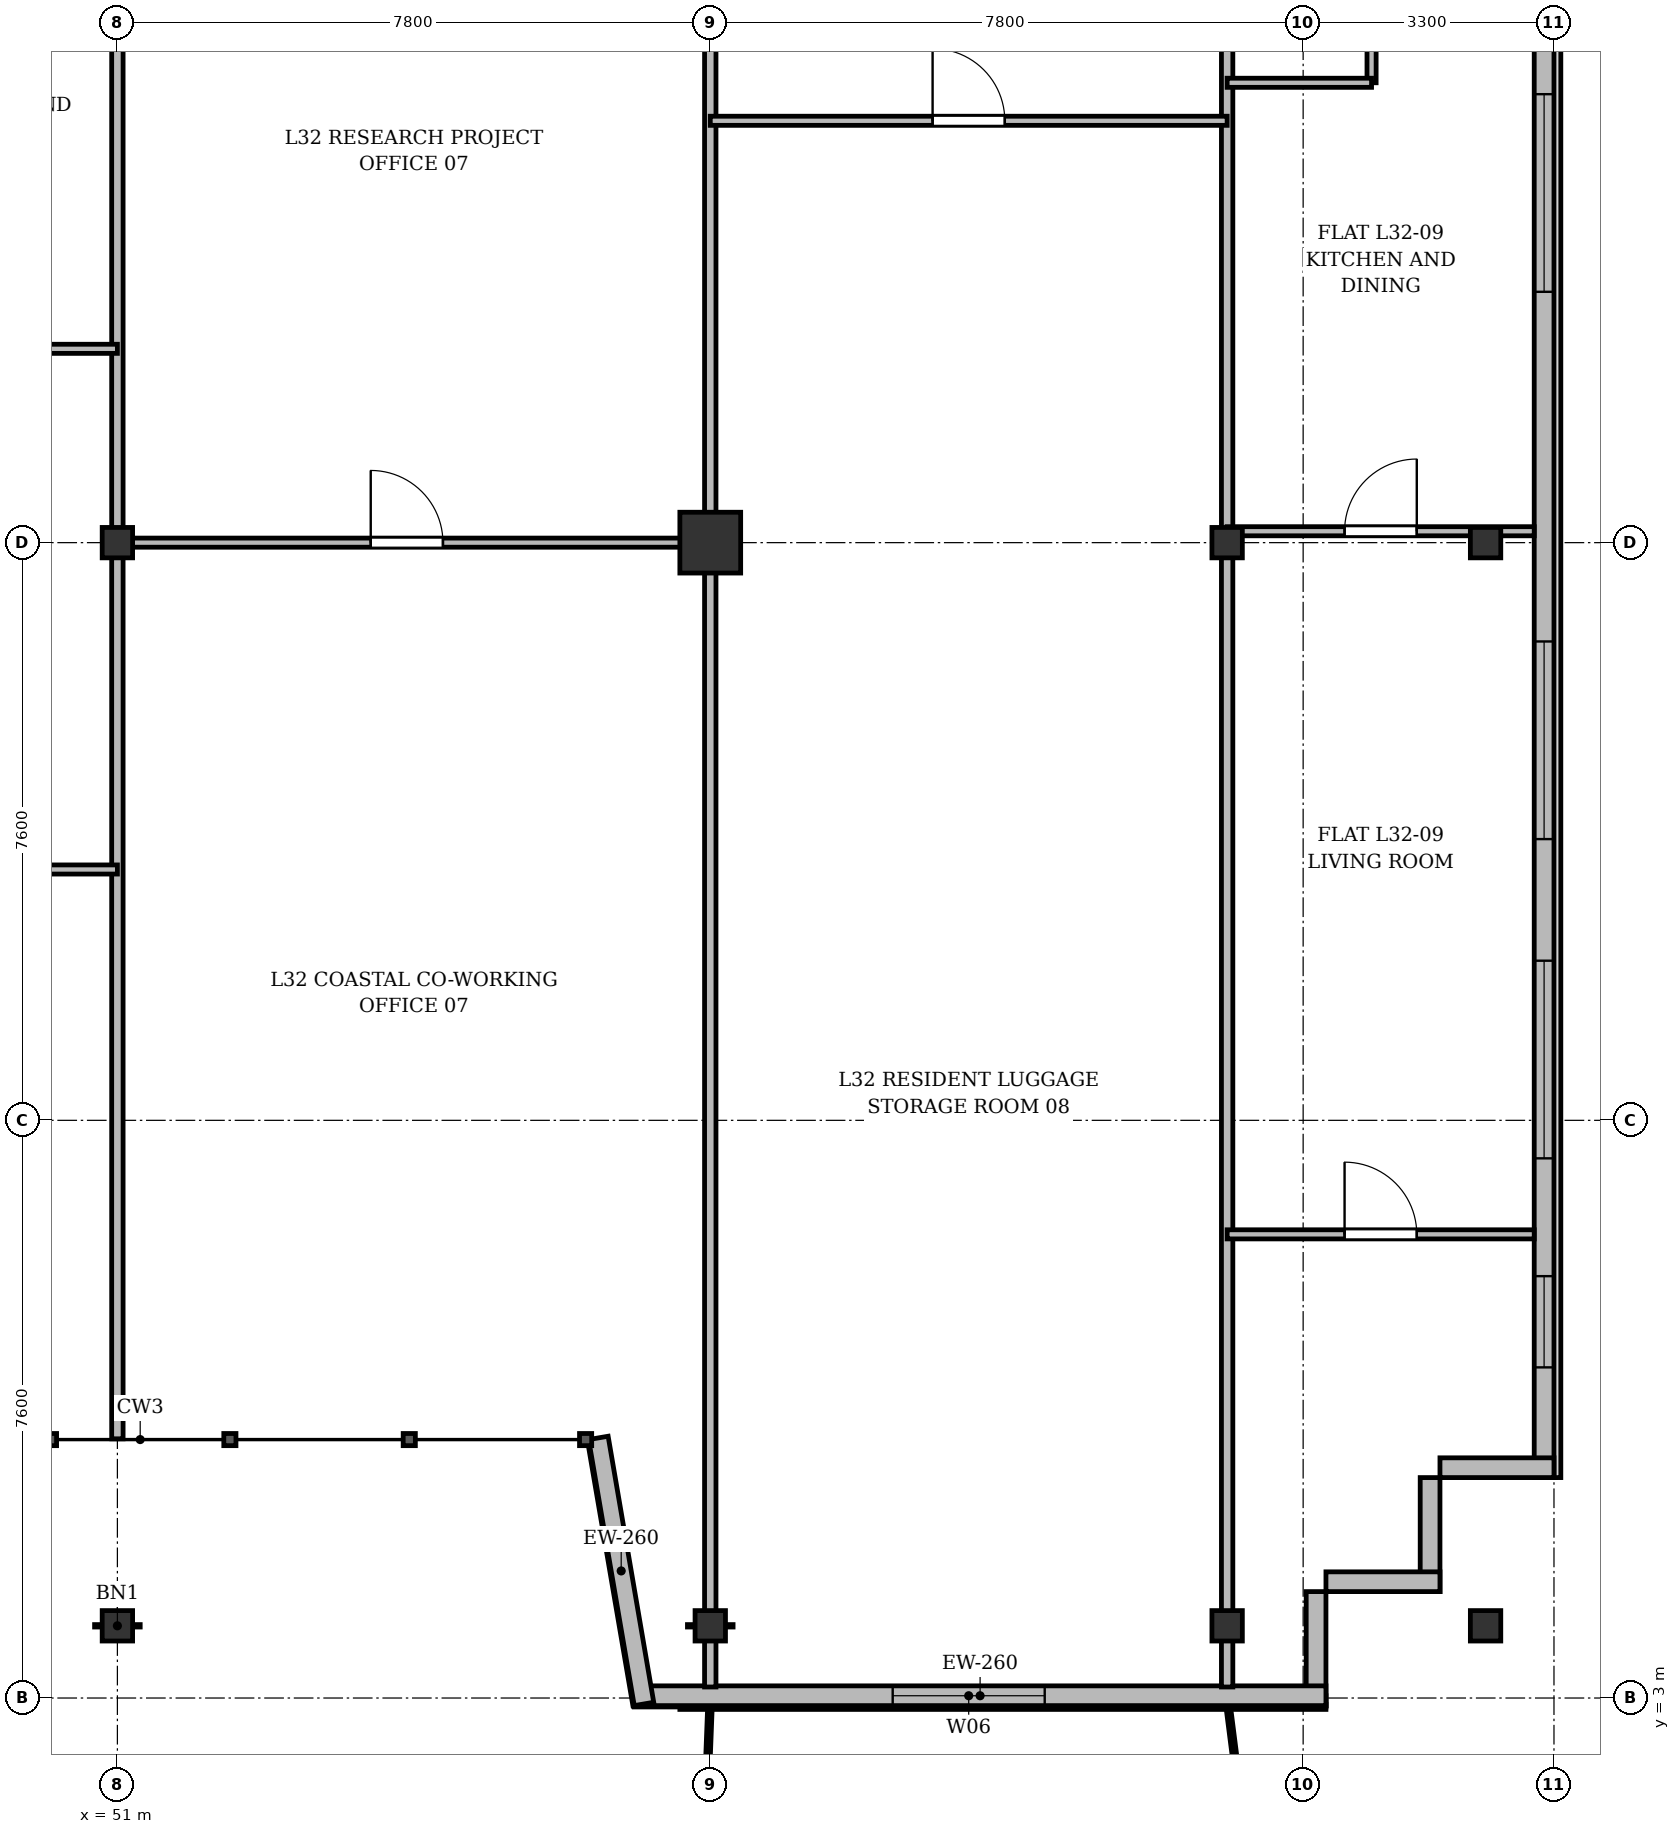
"""IFC4 building model, lengths in metres.
Left out: names, types, materials, properties, quantities, classifications, styles, units other than length and angle.
Written with IfcOpenShell. Run it as: python <this file> out.ifc"""

import sys

from ifc_helpers import new_model, si_unit, direction, frame, frame_2d, origin, origin_2d, place, context, subcontext, project, spatial, rectangle, i_section, extrude, source, transform, mapped, element, fill, save


model = new_model("IFC4")
c1 = context("Model", 3, precision=1e-05, world=origin(), true_north=direction((0.0, 1.0)))
c2 = subcontext(c1, "Body", "Model", "MODEL_VIEW")
j1 = project(units=[si_unit("LENGTHUNIT", "METRE"), si_unit("PLANEANGLEUNIT", "RADIAN")], contexts=[c1])
p1 = place(None, origin())
s1 = spatial("IfcSite", under=j1, at=p1, CompositionType="ELEMENT")
p2 = place(p1, origin())
s2 = spatial("IfcBuilding", under=s1, at=p2, CompositionType="ELEMENT")
p3 = place(p2, frame((0.0, 0.0, 124.9)))
s3 = spatial("IfcBuildingStorey", under=s2, at=p3, CompositionType="ELEMENT", Elevation=124.9)
m1 = source(origin(), c2, "Body", "SweptSolid", [
    extrude(i_section(OverallWidth=0.4, OverallDepth=0.4, WebThickness=0.022, FlangeThickness=0.035, at=origin_2d()), origin(), (0.0, 0.0, 1.0), 3.6),
])
for number, where, z_axis, x_axis in (
    (1, (51.0, 3.95, 0.0), (0.0, 0.0, 1.0), (1.0, 0.0, 0.0)),
    (2, (51.0, 18.2, 0.0), (0.0, 0.0, 1.0), (1.0, 0.0, 0.0)),
    (3, (58.8, 3.95, 0.0), (0.0, 0.0, 1.0), (1.0, 0.0, 0.0)),
):
    element("IfcColumn", number, at=place(p3, frame(where, z_axis=z_axis, x_axis=x_axis)), inside=s3, PredefinedType="COLUMN", context=c2, shape_type="MappedRepresentation", body=[
        mapped(m1, transform((0.0, 0.0, 0.0), x_axis=(1.0, 0.0, 0.0), y_axis=(0.0, 1.0, 0.0), z_axis=(0.0, 0.0, 1.0), scale=1.0)),
    ])
m2 = source(origin(), c2, "Body", "SweptSolid", [
    extrude(rectangle(XDim=0.8, YDim=0.8, at=origin_2d()), origin(), (0.0, 0.0, 1.0), 3.6),
])
p4 = place(p3, frame((58.8, 18.2, 0.0), z_axis=(0.0, 0.0, 1.0), x_axis=(1.0, 0.0, 0.0)))
e4 = element("IfcColumn", 4, at=p4, inside=s3, PredefinedType="COLUMN", context=c2, shape_type="MappedRepresentation", body=[
    mapped(m2, transform((0.0, 0.0, 0.0), x_axis=(1.0, 0.0, 0.0), y_axis=(0.0, 1.0, 0.0), z_axis=(0.0, 0.0, 1.0), scale=1.0)),
])
for number, where, z_axis, x_axis in (
    (5, (65.6, 3.95, 0.0), (0.0, 0.0, 1.0), (1.0, 0.0, 0.0)),
    (6, (65.6, 18.2, 0.0), (0.0, 0.0, 1.0), (1.0, 0.0, 0.0)),
    (7, (69.0, 3.95, 0.0), (0.0, 0.0, 1.0), (1.0, 0.0, 0.0)),
    (8, (69.0, 18.2, 0.0), (0.0, 0.0, 1.0), (1.0, 0.0, 0.0)),
):
    element("IfcColumn", number, at=place(p3, frame(where, z_axis=z_axis, x_axis=x_axis)), inside=s3, PredefinedType="COLUMN", context=c2, shape_type="MappedRepresentation", body=[
        mapped(m1, transform((0.0, 0.0, 0.0), x_axis=(1.0, 0.0, 0.0), y_axis=(0.0, 1.0, 0.0), z_axis=(0.0, 0.0, 1.0), scale=1.0)),
    ])
p5 = place(p3, frame((69.77, 45.5, 0.0), z_axis=(0.0, 0.0, 1.0), x_axis=(0.0, -1.0, 0.0)))
e9 = element("IfcWall", 9, at=p5, inside=s3, PredefinedType="SOLIDWALL", context=c2, shape_type="SweptSolid", body=[
    extrude(rectangle(XDim=39.6, YDim=0.26, at=frame_2d((19.8, 0.0))), origin(), (0.0, 0.0, 1.0), 3.34),
])
p6 = place(p5, frame((36.95, 0.0, 0.92)))
e10 = element("IfcOpeningElement", 10, at=p6, cuts=e9, PredefinedType="OPENING", context=c2, shape_type="SweptSolid", body=[
    extrude(rectangle(XDim=1.2, YDim=1.65, at=frame_2d((0.6, 0.825))), frame((0.0, 0.14, 0.0), z_axis=(0.0, -1.0, 0.0), x_axis=(1.0, 0.0, 0.0)), (0.0, 0.0, 1.0), 0.28),
])
p7 = place(p5, frame((32.8, 0.0, 0.92)))
e11 = element("IfcOpeningElement", 11, at=p7, cuts=e9, PredefinedType="OPENING", context=c2, shape_type="SweptSolid", body=[
    extrude(rectangle(XDim=2.6, YDim=1.9, at=frame_2d((1.3, 0.95))), frame((0.0, 0.14, 0.0), z_axis=(0.0, -1.0, 0.0), x_axis=(1.0, 0.0, 0.0)), (0.0, 0.0, 1.0), 0.28),
])
p8 = place(p5, frame((28.6, 0.0, 0.92)))
e12 = element("IfcOpeningElement", 12, at=p8, cuts=e9, PredefinedType="OPENING", context=c2, shape_type="SweptSolid", body=[
    extrude(rectangle(XDim=2.6, YDim=1.9, at=frame_2d((1.3, 0.95))), frame((0.0, 0.14, 0.0), z_axis=(0.0, -1.0, 0.0), x_axis=(1.0, 0.0, 0.0)), (0.0, 0.0, 1.0), 0.28),
])
p9 = place(p5, frame((21.4, 0.0, 0.92)))
e13 = element("IfcOpeningElement", 13, at=p9, cuts=e9, PredefinedType="OPENING", context=c2, shape_type="SweptSolid", body=[
    extrude(rectangle(XDim=2.6, YDim=1.9, at=frame_2d((1.3, 0.95))), frame((0.0, 0.14, 0.0), z_axis=(0.0, -1.0, 0.0), x_axis=(1.0, 0.0, 0.0)), (0.0, 0.0, 1.0), 0.28),
])
p10 = place(p5, frame((7.4, 0.0, 0.92)))
e14 = element("IfcOpeningElement", 14, at=p10, cuts=e9, PredefinedType="OPENING", context=c2, shape_type="SweptSolid", body=[
    extrude(rectangle(XDim=2.6, YDim=1.9, at=frame_2d((1.3, 0.95))), frame((0.0, 0.14, 0.0), z_axis=(0.0, -1.0, 0.0), x_axis=(1.0, 0.0, 0.0)), (0.0, 0.0, 1.0), 0.28),
])
p11 = place(p5, frame((4.5, 0.0, 0.92)))
e15 = element("IfcOpeningElement", 15, at=p11, cuts=e9, PredefinedType="OPENING", context=c2, shape_type="SweptSolid", body=[
    extrude(rectangle(XDim=1.2, YDim=1.65, at=frame_2d((0.6, 0.825))), frame((0.0, 0.14, 0.0), z_axis=(0.0, -1.0, 0.0), x_axis=(1.0, 0.0, 0.0)), (0.0, 0.0, 1.0), 0.28),
])
p12 = place(p5, frame((1.15, 0.0, 0.92)))
e16 = element("IfcOpeningElement", 16, at=p12, cuts=e9, PredefinedType="OPENING", context=c2, shape_type="SweptSolid", body=[
    extrude(rectangle(XDim=1.2, YDim=1.65, at=frame_2d((0.6, 0.825))), frame((0.0, 0.14, 0.0), z_axis=(0.0, -1.0, 0.0), x_axis=(1.0, 0.0, 0.0)), (0.0, 0.0, 1.0), 0.28),
])
p13 = place(p3, frame((69.9, 6.03, 0.0), z_axis=(0.0, 0.0, 1.0), x_axis=(-1.0, 0.0, 0.0)))
e17 = element("IfcWall", 17, at=p13, inside=s3, PredefinedType="SOLIDWALL", context=c2, shape_type="SweptSolid", body=[
    extrude(rectangle(XDim=1.5, YDim=0.26, at=frame_2d((0.75, 0.0))), origin(), (0.0, 0.0, 1.0), 2.84),
])
for number, where, z_axis, x_axis in (
    (18, (68.27, 5.9, 0.0), (0.0, 0.0, 1.0), (0.0, -1.0, 0.0)),
    (19, (68.4, 4.53, 0.0), (0.0, 0.0, 1.0), (-1.0, 0.0, 0.0)),
):
    element("IfcWall", number, at=place(p3, frame(where, z_axis=z_axis, x_axis=x_axis)), inside=s3, PredefinedType="SOLIDWALL", context=c2, shape_type="SweptSolid", body=[
        extrude(rectangle(XDim=1.5, YDim=0.26, at=frame_2d((0.75, 0.0))), origin(), (0.0, 0.0, 1.0), 3.34),
    ])
p14 = place(p3, frame((66.77, 4.4, 0.0), z_axis=(0.0, 0.0, 1.0), x_axis=(0.0, -1.0, 0.0)))
e20 = element("IfcWall", 20, at=p14, inside=s3, PredefinedType="SOLIDWALL", context=c2, shape_type="SweptSolid", body=[
    extrude(rectangle(XDim=1.5, YDim=0.26, at=frame_2d((0.75, 0.0))), origin(), (0.0, 0.0, 1.0), 2.752),
])
p15 = place(p3, frame((66.9, 3.03, 0.0), z_axis=(0.0, 0.0, 1.0), x_axis=(-1.0, 0.0, 0.0)))
e21 = element("IfcWall", 21, at=p15, inside=s3, PredefinedType="SOLIDWALL", context=c2, shape_type="SweptSolid", body=[
    extrude(rectangle(XDim=9.1, YDim=0.26, at=frame_2d((4.55, 0.0))), origin(), (0.0, 0.0, 1.0), 3.34),
])
p16 = place(p15, frame((3.7, 0.0, 0.9)))
e22 = element("IfcOpeningElement", 22, at=p16, cuts=e21, PredefinedType="OPENING", context=c2, shape_type="SweptSolid", body=[
    extrude(rectangle(XDim=2.0, YDim=1.95, at=frame_2d((1.0, 0.975))), frame((0.0, 0.14, 0.0), z_axis=(0.0, -1.0, 0.0), x_axis=(1.0, 0.0, 0.0)), (0.0, 0.0, 1.0), 0.28),
])
p17 = place(p3, frame((57.928, 2.922, 0.0), z_axis=(0.0, 0.0, 1.0), x_axis=(-0.168923741424, 0.98562912375, 0.0)))
e23 = element("IfcWall", 23, at=p17, inside=s3, PredefinedType="SOLIDWALL", context=c2, shape_type="SweptSolid", body=[
    extrude(rectangle(XDim=3.551, YDim=0.26, at=frame_2d((1.775, 0.0))), origin(), (0.0, 0.0, 1.0), 2.752),
])
p18 = place(p3, frame((51.0, 6.41, 0.0), z_axis=(0.0, 0.0, 1.0), x_axis=(0.0, 1.0, 0.0)))
e24 = element("IfcWall", 24, at=p18, inside=s3, PredefinedType="PARTITIONING", context=c2, shape_type="SweptSolid", body=[
    extrude(rectangle(XDim=21.19, YDim=0.15, at=frame_2d((10.595, 0.0))), origin(), (0.0, 0.0, 1.0), 2.84),
])
for number, where, z_axis, x_axis in (
    (25, (58.8, 3.145, 0.0), (0.0, 0.0, 1.0), (0.0, 1.0, 0.0)),
    (26, (65.6, 3.145, 0.0), (0.0, 0.0, 1.0), (0.0, 1.0, 0.0)),
):
    element("IfcWall", number, at=place(p3, frame(where, z_axis=z_axis, x_axis=x_axis)), inside=s3, PredefinedType="PARTITIONING", context=c2, shape_type="SweptSolid", body=[
        extrude(rectangle(XDim=24.455, YDim=0.15, at=frame_2d((12.228, 0.0))), origin(), (0.0, 0.0, 1.0), 2.84),
    ])
p19 = place(p3, frame((43.8, 20.75, 0.0), z_axis=(0.0, 0.0, 1.0), x_axis=(1.0, 0.0, 0.0)))
e27 = element("IfcWall", 27, at=p19, inside=s3, PredefinedType="PARTITIONING", context=c2, shape_type="SweptSolid", body=[
    extrude(rectangle(XDim=7.2, YDim=0.12, at=frame_2d((3.6, 0.0))), origin(), (0.0, 0.0, 1.0), 2.84),
])
p20 = place(p19, frame((3.125, 0.0, 0.0)))
e28 = element("IfcOpeningElement", 28, at=p20, cuts=e27, PredefinedType="OPENING", context=c2, shape_type="SweptSolid", body=[
    extrude(rectangle(XDim=0.95, YDim=2.15, at=frame_2d((0.475, 1.075))), frame((0.0, 0.07, 0.0), z_axis=(0.0, -1.0, 0.0), x_axis=(1.0, 0.0, 0.0)), (0.0, 0.0, 1.0), 0.14),
])
p21 = place(p3, frame((47.4, 13.9, 0.0), z_axis=(0.0, 0.0, 1.0), x_axis=(1.0, 0.0, 0.0)))
e29 = element("IfcWall", 29, at=p21, inside=s3, PredefinedType="PARTITIONING", context=c2, shape_type="SweptSolid", body=[
    extrude(rectangle(XDim=3.6, YDim=0.12, at=frame_2d((1.8, 0.0))), origin(), (0.0, 0.0, 1.0), 2.84),
])
p22 = place(p21, frame((1.325, 0.0, 0.0)))
e30 = element("IfcOpeningElement", 30, at=p22, cuts=e29, PredefinedType="OPENING", context=c2, shape_type="SweptSolid", body=[
    extrude(rectangle(XDim=0.95, YDim=2.15, at=frame_2d((0.475, 1.075))), frame((0.0, 0.07, 0.0), z_axis=(0.0, -1.0, 0.0), x_axis=(1.0, 0.0, 0.0)), (0.0, 0.0, 1.0), 0.14),
])
p23 = place(p3, frame((51.0, 18.2, 0.0), z_axis=(0.0, 0.0, 1.0), x_axis=(1.0, 0.0, 0.0)))
e31 = element("IfcWall", 31, at=p23, inside=s3, PredefinedType="PARTITIONING", context=c2, shape_type="SweptSolid", body=[
    extrude(rectangle(XDim=7.8, YDim=0.12, at=frame_2d((3.9, 0.0))), origin(), (0.0, 0.0, 1.0), 2.752),
])
p24 = place(p23, frame((3.333, 0.0, 0.0)))
e32 = element("IfcOpeningElement", 32, at=p24, cuts=e31, PredefinedType="OPENING", context=c2, shape_type="SweptSolid", body=[
    extrude(rectangle(XDim=0.95, YDim=2.15, at=frame_2d((0.475, 1.075))), frame((0.0, 0.07, 0.0), z_axis=(0.0, -1.0, 0.0), x_axis=(1.0, 0.0, 0.0)), (0.0, 0.0, 1.0), 0.14),
])
p25 = place(p3, frame((58.8, 23.75, 0.0), z_axis=(0.0, 0.0, 1.0), x_axis=(1.0, 0.0, 0.0)))
e33 = element("IfcWall", 33, at=p25, inside=s3, PredefinedType="PARTITIONING", context=c2, shape_type="SweptSolid", body=[
    extrude(rectangle(XDim=6.8, YDim=0.12, at=frame_2d((3.4, 0.0))), origin(), (0.0, 0.0, 1.0), 2.84),
])
p26 = place(p25, frame((2.925, 0.0, 0.0)))
e34 = element("IfcOpeningElement", 34, at=p26, cuts=e33, PredefinedType="OPENING", context=c2, shape_type="SweptSolid", body=[
    extrude(rectangle(XDim=0.95, YDim=2.15, at=frame_2d((0.475, 1.075))), frame((0.0, 0.07, 0.0), z_axis=(0.0, -1.0, 0.0), x_axis=(1.0, 0.0, 0.0)), (0.0, 0.0, 1.0), 0.14),
])
p27 = place(p3, frame((65.6, 18.35, 0.0), z_axis=(0.0, 0.0, 1.0), x_axis=(1.0, 0.0, 0.0)))
e35 = element("IfcWall", 35, at=p27, inside=s3, PredefinedType="PARTITIONING", context=c2, shape_type="SweptSolid", body=[
    extrude(rectangle(XDim=4.04, YDim=0.12, at=frame_2d((2.02, 0.0))), origin(), (0.0, 0.0, 1.0), 2.752),
])
p28 = place(p27, frame((1.545, 0.0, 0.0)))
e36 = element("IfcOpeningElement", 36, at=p28, cuts=e35, PredefinedType="OPENING", context=c2, shape_type="SweptSolid", body=[
    extrude(rectangle(XDim=0.95, YDim=2.15, at=frame_2d((0.475, 1.075))), frame((0.0, 0.07, 0.0), z_axis=(0.0, -1.0, 0.0), x_axis=(1.0, 0.0, 0.0)), (0.0, 0.0, 1.0), 0.14),
])
p29 = place(p3, frame((67.5, 24.25, 0.0), z_axis=(0.0, 0.0, 1.0), x_axis=(0.0, 1.0, 0.0)))
e37 = element("IfcWall", 37, at=p29, inside=s3, PredefinedType="PARTITIONING", context=c2, shape_type="SweptSolid", body=[
    extrude(rectangle(XDim=3.35, YDim=0.12, at=frame_2d((1.675, 0.0))), origin(), (0.0, 0.0, 1.0), 2.99),
])
p30 = place(p29, frame((0.8, 0.0, 0.0)))
e38 = element("IfcOpeningElement", 38, at=p30, cuts=e37, PredefinedType="OPENING", context=c2, shape_type="SweptSolid", body=[
    extrude(rectangle(XDim=0.85, YDim=2.1, at=frame_2d((0.425, 1.05))), frame((0.0, 0.07, 0.0), z_axis=(0.0, -1.0, 0.0), x_axis=(1.0, 0.0, 0.0)), (0.0, 0.0, 1.0), 0.14),
])
p31 = place(p3, frame((65.6, 24.25, 0.0), z_axis=(0.0, 0.0, 1.0), x_axis=(1.0, 0.0, 0.0)))
e39 = element("IfcWall", 39, at=p31, inside=s3, PredefinedType="PARTITIONING", context=c2, shape_type="SweptSolid", body=[
    extrude(rectangle(XDim=1.9, YDim=0.12, at=frame_2d((0.95, 0.0))), origin(), (0.0, 0.0, 1.0), 2.84),
])
p32 = place(p3, frame((65.6, 9.1, 0.0), z_axis=(0.0, 0.0, 1.0), x_axis=(1.0, 0.0, 0.0)))
e40 = element("IfcWall", 40, at=p32, inside=s3, PredefinedType="PARTITIONING", context=c2, shape_type="SweptSolid", body=[
    extrude(rectangle(XDim=4.04, YDim=0.12, at=frame_2d((2.02, 0.0))), origin(), (0.0, 0.0, 1.0), 2.84),
])
p33 = place(p32, frame((1.545, 0.0, 0.0)))
e41 = element("IfcOpeningElement", 41, at=p33, cuts=e40, PredefinedType="OPENING", context=c2, shape_type="SweptSolid", body=[
    extrude(rectangle(XDim=0.95, YDim=2.15, at=frame_2d((0.475, 1.075))), frame((0.0, 0.07, 0.0), z_axis=(0.0, -1.0, 0.0), x_axis=(1.0, 0.0, 0.0)), (0.0, 0.0, 1.0), 0.14),
])
m3 = source(origin(), c2, "Body", "SweptSolid", [
    extrude(rectangle(XDim=1.2, YDim=1.65, at=frame_2d((0.6, 0.825))), frame((0.0, 0.03, 0.0), z_axis=(0.0, -1.0, 0.0), x_axis=(1.0, 0.0, 0.0)), (0.0, 0.0, 1.0), 0.06),
])
p34 = place(p6, origin())
e42 = element("IfcWindow", 42, at=p34, inside=s3, PartitioningType="SINGLE_PANEL", PredefinedType="WINDOW", context=c2, shape_type="MappedRepresentation", body=[
    mapped(m3, transform((0.0, 0.0, 0.0), x_axis=(1.0, 0.0, 0.0), y_axis=(0.0, 1.0, 0.0), z_axis=(0.0, 0.0, 1.0), scale=1.0)),
])
fill(e10, e42)
m4 = source(origin(), c2, "Body", "SweptSolid", [
    extrude(rectangle(XDim=2.6, YDim=1.9, at=frame_2d((1.3, 0.95))), frame((0.0, 0.03, 0.0), z_axis=(0.0, -1.0, 0.0), x_axis=(1.0, 0.0, 0.0)), (0.0, 0.0, 1.0), 0.06),
])
p35 = place(p7, origin())
e43 = element("IfcWindow", 43, at=p35, inside=s3, PartitioningType="SINGLE_PANEL", PredefinedType="WINDOW", context=c2, shape_type="MappedRepresentation", body=[
    mapped(m4, transform((0.0, 0.0, 0.0), x_axis=(1.0, 0.0, 0.0), y_axis=(0.0, 1.0, 0.0), z_axis=(0.0, 0.0, 1.0), scale=1.0)),
])
fill(e11, e43)
p36 = place(p8, origin())
e44 = element("IfcWindow", 44, at=p36, inside=s3, PartitioningType="SINGLE_PANEL", PredefinedType="WINDOW", context=c2, shape_type="MappedRepresentation", body=[
    mapped(m4, transform((0.0, 0.0, 0.0), x_axis=(1.0, 0.0, 0.0), y_axis=(0.0, 1.0, 0.0), z_axis=(0.0, 0.0, 1.0), scale=1.0)),
])
fill(e12, e44)
p37 = place(p9, origin())
e45 = element("IfcWindow", 45, at=p37, inside=s3, PartitioningType="SINGLE_PANEL", PredefinedType="WINDOW", context=c2, shape_type="MappedRepresentation", body=[
    mapped(m4, transform((0.0, 0.0, 0.0), x_axis=(1.0, 0.0, 0.0), y_axis=(0.0, 1.0, 0.0), z_axis=(0.0, 0.0, 1.0), scale=1.0)),
])
fill(e13, e45)
m5 = source(origin(), c2, "Body", "SweptSolid", [
    extrude(rectangle(XDim=2.0, YDim=1.95, at=frame_2d((1.0, 0.975))), frame((0.0, 0.03, 0.0), z_axis=(0.0, -1.0, 0.0), x_axis=(1.0, 0.0, 0.0)), (0.0, 0.0, 1.0), 0.06),
])
p38 = place(p16, origin())
e46 = element("IfcWindow", 46, at=p38, inside=s3, PartitioningType="SINGLE_PANEL", PredefinedType="WINDOW", context=c2, shape_type="MappedRepresentation", body=[
    mapped(m5, transform((0.0, 0.0, 0.0), x_axis=(1.0, 0.0, 0.0), y_axis=(0.0, 1.0, 0.0), z_axis=(0.0, 0.0, 1.0), scale=1.0)),
])
fill(e22, e46)
m6 = source(origin(), c2, "Body", "SweptSolid", [
    extrude(rectangle(XDim=0.95, YDim=2.15, at=frame_2d((0.475, 1.075))), frame((0.0, 0.025, 0.0), z_axis=(0.0, -1.0, 0.0), x_axis=(1.0, 0.0, 0.0)), (0.0, 0.0, 1.0), 0.05),
])
p39 = place(p24, origin())
e47 = element("IfcDoor", 47, at=p39, inside=s3, OperationType="SINGLE_SWING_LEFT", PredefinedType="DOOR", context=c2, shape_type="MappedRepresentation", body=[
    mapped(m6, transform((0.0, 0.0, 0.0), x_axis=(1.0, 0.0, 0.0), y_axis=(0.0, 1.0, 0.0), z_axis=(0.0, 0.0, 1.0), scale=1.0)),
])
fill(e32, e47)
p40 = place(p26, origin())
e48 = element("IfcDoor", 48, at=p40, inside=s3, OperationType="SINGLE_SWING_LEFT", PredefinedType="DOOR", context=c2, shape_type="MappedRepresentation", body=[
    mapped(m6, transform((0.0, 0.0, 0.0), x_axis=(1.0, 0.0, 0.0), y_axis=(0.0, 1.0, 0.0), z_axis=(0.0, 0.0, 1.0), scale=1.0)),
])
fill(e34, e48)
p41 = place(p28, origin())
e49 = element("IfcDoor", 49, at=p41, inside=s3, OperationType="SINGLE_SWING_RIGHT", PredefinedType="DOOR", context=c2, shape_type="MappedRepresentation", body=[
    mapped(m6, transform((0.0, 0.0, 0.0), x_axis=(1.0, 0.0, 0.0), y_axis=(0.0, 1.0, 0.0), z_axis=(0.0, 0.0, 1.0), scale=1.0)),
])
fill(e36, e49)
p42 = place(p33, origin())
e50 = element("IfcDoor", 50, at=p42, inside=s3, OperationType="SINGLE_SWING_LEFT", PredefinedType="DOOR", context=c2, shape_type="MappedRepresentation", body=[
    mapped(m6, transform((0.0, 0.0, 0.0), x_axis=(1.0, 0.0, 0.0), y_axis=(0.0, 1.0, 0.0), z_axis=(0.0, 0.0, 1.0), scale=1.0)),
])
fill(e41, e50)
save(model, sys.argv[1])
